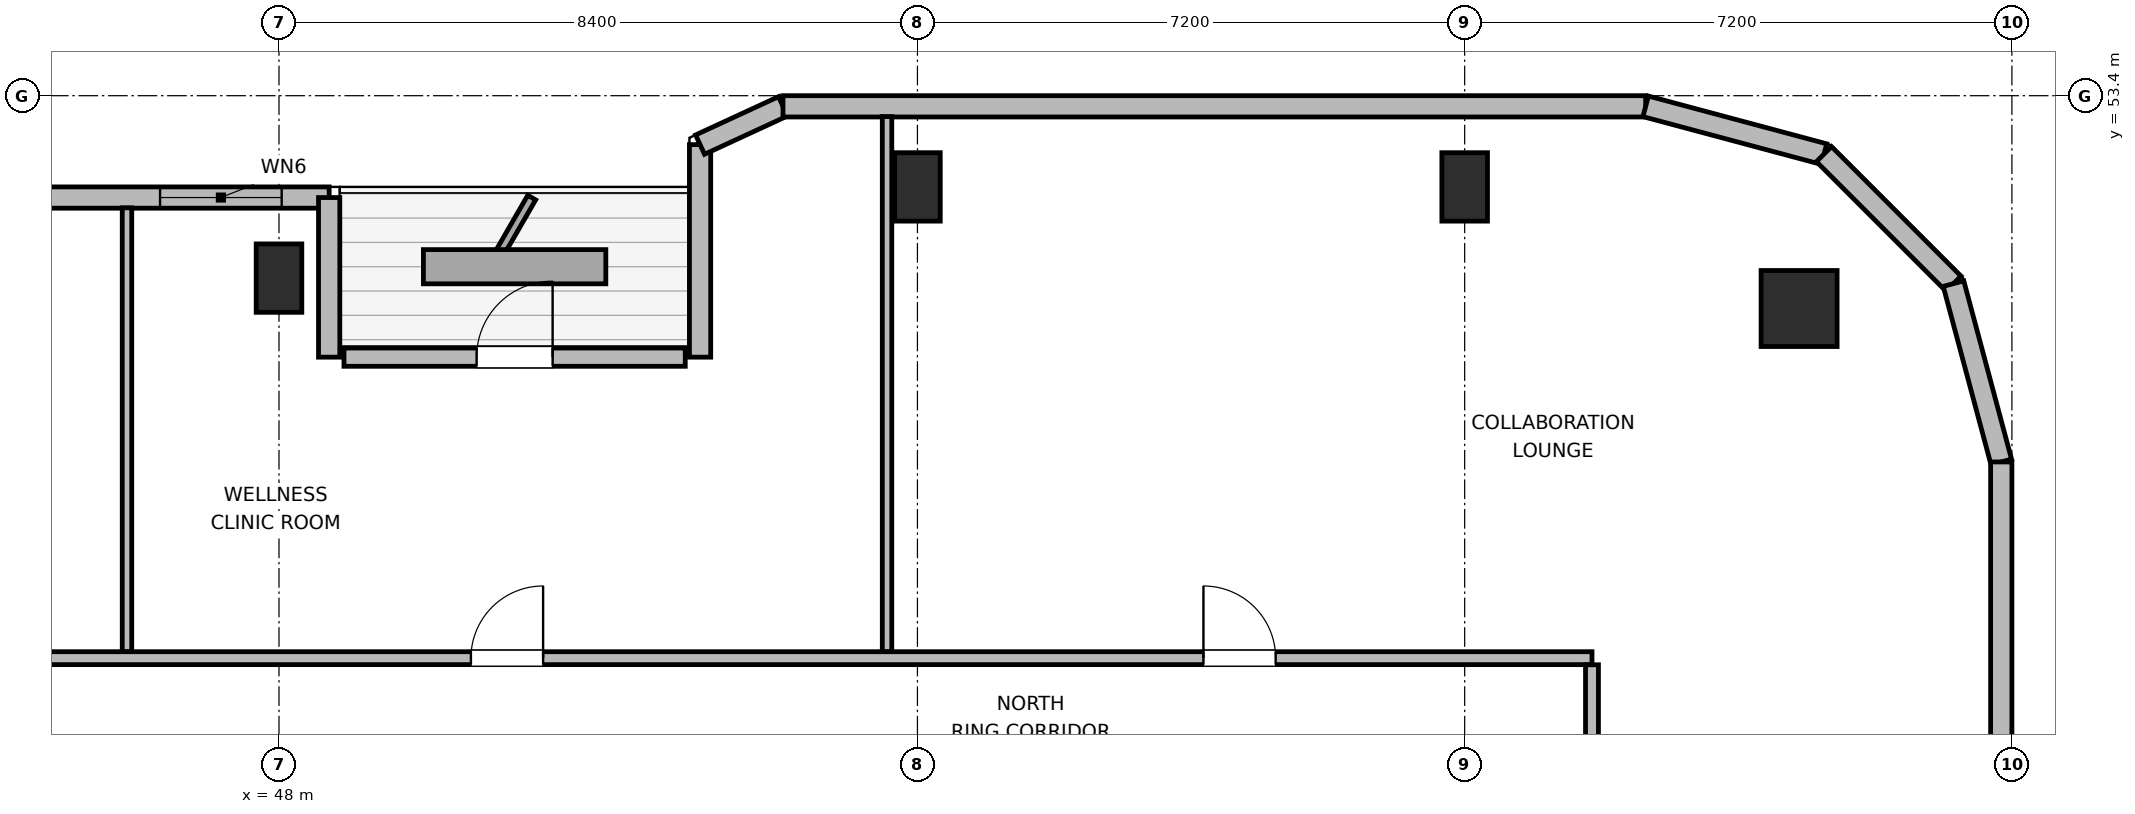
"""IFC4 building model, lengths in metres.
Left out: names, types, materials, properties, quantities, classifications, styles, units other than length and angle.
Written with IfcOpenShell. Run it as: python <this file> out.ifc"""

import sys

from ifc_helpers import new_model, si_unit, direction, frame, frame_2d, origin, origin_2d, place, context, subcontext, project, spatial, rectangle, circle, extrude, element, fill, save


model = new_model("IFC4")
c1 = context("Model", 3, precision=1e-05, world=origin(), true_north=direction((0.0, 1.0)))
c2 = subcontext(c1, "Body", "Model", "MODEL_VIEW")
j1 = project(units=[si_unit("LENGTHUNIT", "METRE"), si_unit("PLANEANGLEUNIT", "RADIAN")], contexts=[c1])
p1 = place(None, origin())
s1 = spatial("IfcSite", under=j1, at=p1, CompositionType="ELEMENT")
p2 = place(p1, origin())
s2 = spatial("IfcBuilding", under=s1, at=p2, CompositionType="ELEMENT")
p3 = place(p2, frame((0.0, 0.0, 314.1)))
s3 = spatial("IfcBuildingStorey", under=s2, at=p3, CompositionType="ELEMENT", Elevation=314.1)
p4 = place(p3, frame((68.0, 50.6, 0.0), z_axis=(0.0, 0.0, 1.0), x_axis=(1.0, 0.0, 0.0)))
e1 = element("IfcColumn", 1, at=p4, inside=s3, PredefinedType="COLUMN", context=c2, shape_type="SweptSolid", body=[
    extrude(circle(Radius=0.5, at=origin_2d()), origin(), (0.0, 0.0, 1.0), 3.9),
])
for number, where, z_axis, x_axis in (
    (2, (48.0, 51.0, 0.0), (0.0, 0.0, 1.0), (1.0, 0.0, 0.0)),
    (3, (56.4, 52.2, 0.0), (0.0, 0.0, 1.0), (1.0, 0.0, 0.0)),
    (4, (63.6, 52.2, 0.0), (0.0, 0.0, 1.0), (1.0, 0.0, 0.0)),
):
    element("IfcColumn", number, at=place(p3, frame(where, z_axis=z_axis, x_axis=x_axis)), inside=s3, PredefinedType="COLUMN", context=c2, shape_type="SweptSolid", body=[
        extrude(rectangle(XDim=0.6, YDim=0.9, at=origin_2d()), origin(), (0.0, 0.0, 1.0), 3.9),
    ])
p5 = place(p3, frame((43.969, 52.06, 0.0), z_axis=(0.0, 0.0, 1.0), x_axis=(1.0, 0.0, 0.0)))
e5 = element("IfcWall", 5, at=p5, inside=s3, PredefinedType="SOLIDWALL", context=c2, shape_type="SweptSolid", body=[
    extrude(rectangle(XDim=4.691, YDim=0.28, at=frame_2d((2.345, 0.0))), origin(), (0.0, 0.0, 1.0), 2.265),
])
p6 = place(p5, frame((2.466, 0.0, 0.85)))
e6 = element("IfcOpeningElement", 6, at=p6, cuts=e5, PredefinedType="OPENING", context=c2, shape_type="SweptSolid", body=[
    extrude(rectangle(XDim=1.6, YDim=1.0, at=frame_2d((0.8, 0.5))), frame((0.0, 0.15, 0.0), z_axis=(0.0, -1.0, 0.0), x_axis=(1.0, 0.0, 0.0)), (0.0, 0.0, 1.0), 0.3),
])
p7 = place(p3, frame((48.66, 52.06, 0.0), z_axis=(0.0, 0.0, 1.0), x_axis=(0.0, -1.0, 0.0)))
e7 = element("IfcWall", 7, at=p7, inside=s3, PredefinedType="SOLIDWALL", context=c2, shape_type="SweptSolid", body=[
    extrude(rectangle(XDim=2.1, YDim=0.28, at=frame_2d((1.05, 0.0))), origin(), (0.0, 0.0, 1.0), 2.265),
])
p8 = place(p3, frame((48.855, 49.96, 0.0), z_axis=(0.0, 0.0, 1.0), x_axis=(1.0, 0.0, 0.0)))
e8 = element("IfcWall", 8, at=p8, inside=s3, PredefinedType="SOLIDWALL", context=c2, shape_type="SweptSolid", body=[
    extrude(rectangle(XDim=4.49, YDim=0.24, at=frame_2d((2.245, 0.0))), origin(), (0.0, 0.0, 1.0), 3.68),
])
p9 = place(p8, frame((1.745, 0.0, 0.0)))
e9 = element("IfcOpeningElement", 9, at=p9, cuts=e8, PredefinedType="OPENING", context=c2, shape_type="SweptSolid", body=[
    extrude(rectangle(XDim=1.0, YDim=2.02, at=frame_2d((0.5, 1.01))), frame((0.0, 0.13, 0.0), z_axis=(0.0, -1.0, 0.0), x_axis=(1.0, 0.0, 0.0)), (0.0, 0.0, 1.0), 0.26),
])
p10 = place(p3, frame((53.54, 49.96, 0.0), z_axis=(0.0, 0.0, 1.0), x_axis=(0.0, 1.0, 0.0)))
e10 = element("IfcWall", 10, at=p10, inside=s3, PredefinedType="SOLIDWALL", context=c2, shape_type="SweptSolid", body=[
    extrude(rectangle(XDim=2.796, YDim=0.28, at=frame_2d((1.398, 0.0))), origin(), (0.0, 0.0, 1.0), 2.265),
])
p11 = place(p3, frame((53.54, 52.756, 0.0), z_axis=(0.0, 0.0, 1.0), x_axis=(0.907893953211, 0.419199916176, 0.0)))
e11 = element("IfcWall", 11, at=p11, inside=s3, PredefinedType="SOLIDWALL", context=c2, shape_type="SweptSolid", body=[
    extrude(rectangle(XDim=1.201, YDim=0.28, at=frame_2d((0.601, 0.0))), origin(), (0.0, 0.0, 1.0), 3.68),
])
p12 = place(p3, frame((54.631, 53.26, 0.0), z_axis=(0.0, 0.0, 1.0), x_axis=(1.0, 0.0, 0.0)))
e12 = element("IfcWall", 12, at=p12, inside=s3, PredefinedType="SOLIDWALL", context=c2, shape_type="SweptSolid", body=[
    extrude(rectangle(XDim=11.351, YDim=0.28, at=frame_2d((5.675, 0.0))), origin(), (0.0, 0.0, 1.0), 3.68),
])
p13 = place(p3, frame((65.982, 53.26, 0.0), z_axis=(0.0, 0.0, 1.0), x_axis=(0.965937282298, -0.25877628691, 0.0)))
e13 = element("IfcWall", 13, at=p13, inside=s3, PredefinedType="SOLIDWALL", context=c2, shape_type="SweptSolid", body=[
    extrude(rectangle(XDim=2.428, YDim=0.28, at=frame_2d((1.214, 0.0))), origin(), (0.0, 0.0, 1.0), 3.68),
])
p14 = place(p3, frame((68.327, 52.632, 0.0), z_axis=(0.0, 0.0, 1.0), x_axis=(0.707106781187, -0.707106781187, 0.0)))
e14 = element("IfcWall", 14, at=p14, inside=s3, PredefinedType="SOLIDWALL", context=c2, shape_type="SweptSolid", body=[
    extrude(rectangle(XDim=2.41, YDim=0.28, at=frame_2d((1.205, 0.0))), origin(), (0.0, 0.0, 1.0), 3.68),
])
p15 = place(p3, frame((70.031, 50.927, 0.0), z_axis=(0.0, 0.0, 1.0), x_axis=(0.258751159445, -0.965944013639, 0.0)))
e15 = element("IfcWall", 15, at=p15, inside=s3, PredefinedType="SOLIDWALL", context=c2, shape_type="SweptSolid", body=[
    extrude(rectangle(XDim=2.429, YDim=0.28, at=frame_2d((1.214, 0.0))), origin(), (0.0, 0.0, 1.0), 3.68),
])
p16 = place(p3, frame((70.66, 48.582, 0.0), z_axis=(0.0, 0.0, 1.0), x_axis=(0.0, -1.0, 0.0)))
e16 = element("IfcWall", 16, at=p16, inside=s3, PredefinedType="SOLIDWALL", context=c2, shape_type="SweptSolid", body=[
    extrude(rectangle(XDim=5.842, YDim=0.28, at=frame_2d((2.921, 0.0))), origin(), (0.0, 0.0, 1.0), 3.68),
])
p17 = place(p3, frame((30.725, 46.0, 0.0), z_axis=(0.0, 0.0, 1.0), x_axis=(1.0, 0.0, 0.0)))
e17 = element("IfcWall", 17, at=p17, inside=s3, PredefinedType="PARTITIONING", context=c2, shape_type="SweptSolid", body=[
    extrude(rectangle(XDim=34.55, YDim=0.17, at=frame_2d((17.275, 0.0))), origin(), (0.0, 0.0, 1.0), 3.68),
])
p18 = place(p17, frame((2.162, 0.0, 0.0)))
e18 = element("IfcOpeningElement", 18, at=p18, cuts=e17, PredefinedType="OPENING", context=c2, shape_type="SweptSolid", body=[
    extrude(rectangle(XDim=0.95, YDim=2.04, at=frame_2d((0.475, 1.02))), frame((0.0, 0.095, 0.0), z_axis=(0.0, -1.0, 0.0), x_axis=(1.0, 0.0, 0.0)), (0.0, 0.0, 1.0), 0.19),
])
p19 = place(p17, frame((9.8, 0.0, 0.0)))
e19 = element("IfcOpeningElement", 19, at=p19, cuts=e17, PredefinedType="OPENING", context=c2, shape_type="SweptSolid", body=[
    extrude(rectangle(XDim=0.95, YDim=2.04, at=frame_2d((0.475, 1.02))), frame((0.0, 0.095, 0.0), z_axis=(0.0, -1.0, 0.0), x_axis=(1.0, 0.0, 0.0)), (0.0, 0.0, 1.0), 0.19),
])
p20 = place(p17, frame((19.8, 0.0, 0.0)))
e20 = element("IfcOpeningElement", 20, at=p20, cuts=e17, PredefinedType="OPENING", context=c2, shape_type="SweptSolid", body=[
    extrude(rectangle(XDim=0.95, YDim=2.04, at=frame_2d((0.475, 1.02))), frame((0.0, 0.095, 0.0), z_axis=(0.0, -1.0, 0.0), x_axis=(1.0, 0.0, 0.0)), (0.0, 0.0, 1.0), 0.19),
])
p21 = place(p17, frame((29.438, 0.0, 0.0)))
e21 = element("IfcOpeningElement", 21, at=p21, cuts=e17, PredefinedType="OPENING", context=c2, shape_type="SweptSolid", body=[
    extrude(rectangle(XDim=0.95, YDim=2.04, at=frame_2d((0.475, 1.02))), frame((0.0, 0.095, 0.0), z_axis=(0.0, -1.0, 0.0), x_axis=(1.0, 0.0, 0.0)), (0.0, 0.0, 1.0), 0.19),
])
p22 = place(p3, frame((65.275, 26.087, 0.0), z_axis=(0.0, 0.0, 1.0), x_axis=(0.0, 1.0, 0.0)))
e22 = element("IfcWall", 22, at=p22, inside=s3, PredefinedType="PARTITIONING", context=c2, shape_type="SweptSolid", body=[
    extrude(rectangle(XDim=19.826, YDim=0.17, at=frame_2d((9.913, 0.0))), origin(), (0.0, 0.0, 1.0), 3.68),
])
p23 = place(p22, frame((3.938, 0.0, 0.0)))
e23 = element("IfcOpeningElement", 23, at=p23, cuts=e22, PredefinedType="OPENING", context=c2, shape_type="SweptSolid", body=[
    extrude(rectangle(XDim=0.95, YDim=2.04, at=frame_2d((0.475, 1.02))), frame((0.0, 0.095, 0.0), z_axis=(0.0, -1.0, 0.0), x_axis=(1.0, 0.0, 0.0)), (0.0, 0.0, 1.0), 0.19),
])
p24 = place(p22, frame((13.938, 0.0, 0.0)))
e24 = element("IfcOpeningElement", 24, at=p24, cuts=e22, PredefinedType="OPENING", context=c2, shape_type="SweptSolid", body=[
    extrude(rectangle(XDim=0.95, YDim=2.04, at=frame_2d((0.475, 1.02))), frame((0.0, 0.095, 0.0), z_axis=(0.0, -1.0, 0.0), x_axis=(1.0, 0.0, 0.0)), (0.0, 0.0, 1.0), 0.19),
])
p25 = place(p3, frame((46.0, 46.087, 0.0), z_axis=(0.0, 0.0, 1.0), x_axis=(0.0, 1.0, 0.0)))
e25 = element("IfcWall", 25, at=p25, inside=s3, PredefinedType="PARTITIONING", context=c2, shape_type="SweptSolid", body=[
    extrude(rectangle(XDim=5.838, YDim=0.125, at=frame_2d((2.919, 0.0))), origin(), (0.0, 0.0, 1.0), 3.68),
])
p26 = place(p3, frame((56.0, 46.087, 0.0), z_axis=(0.0, 0.0, 1.0), x_axis=(0.0, 1.0, 0.0)))
e26 = element("IfcWall", 26, at=p26, inside=s3, PredefinedType="PARTITIONING", context=c2, shape_type="SweptSolid", body=[
    extrude(rectangle(XDim=7.038, YDim=0.125, at=frame_2d((3.519, 0.0))), origin(), (0.0, 0.0, 1.0), 3.043),
])
p27 = place(p6, origin())
e27 = element("IfcWindow", 27, at=p27, inside=s3, PartitioningType="SINGLE_PANEL", PredefinedType="WINDOW", context=c2, shape_type="SweptSolid", body=[
    extrude(rectangle(XDim=1.6, YDim=1.0, at=frame_2d((0.8, 0.5))), frame((0.0, 0.03, 0.0), z_axis=(0.0, -1.0, 0.0), x_axis=(1.0, 0.0, 0.0)), (0.0, 0.0, 1.0), 0.06),
])
fill(e6, e27)
p28 = place(p9, origin())
e28 = element("IfcDoor", 28, at=p28, inside=s3, OperationType="SINGLE_SWING_RIGHT", PredefinedType="DOOR", context=c2, shape_type="SweptSolid", body=[
    extrude(rectangle(XDim=1.0, YDim=2.02, at=frame_2d((0.5, 1.01))), frame((0.0, 0.025, 0.0), z_axis=(0.0, -1.0, 0.0), x_axis=(1.0, 0.0, 0.0)), (0.0, 0.0, 1.0), 0.05),
])
fill(e9, e28)
p29 = place(p20, origin())
e29 = element("IfcDoor", 29, at=p29, inside=s3, OperationType="SINGLE_SWING_RIGHT", PredefinedType="DOOR", context=c2, shape_type="SweptSolid", body=[
    extrude(rectangle(XDim=0.95, YDim=2.04, at=frame_2d((0.475, 1.02))), frame((0.0, 0.025, 0.0), z_axis=(0.0, -1.0, 0.0), x_axis=(1.0, 0.0, 0.0)), (0.0, 0.0, 1.0), 0.05),
])
fill(e20, e29)
p30 = place(p21, origin())
e30 = element("IfcDoor", 30, at=p30, inside=s3, OperationType="SINGLE_SWING_LEFT", PredefinedType="DOOR", context=c2, shape_type="SweptSolid", body=[
    extrude(rectangle(XDim=0.95, YDim=2.04, at=frame_2d((0.475, 1.02))), frame((0.0, 0.025, 0.0), z_axis=(0.0, -1.0, 0.0), x_axis=(1.0, 0.0, 0.0)), (0.0, 0.0, 1.0), 0.05),
])
fill(e21, e30)
save(model, sys.argv[1])
